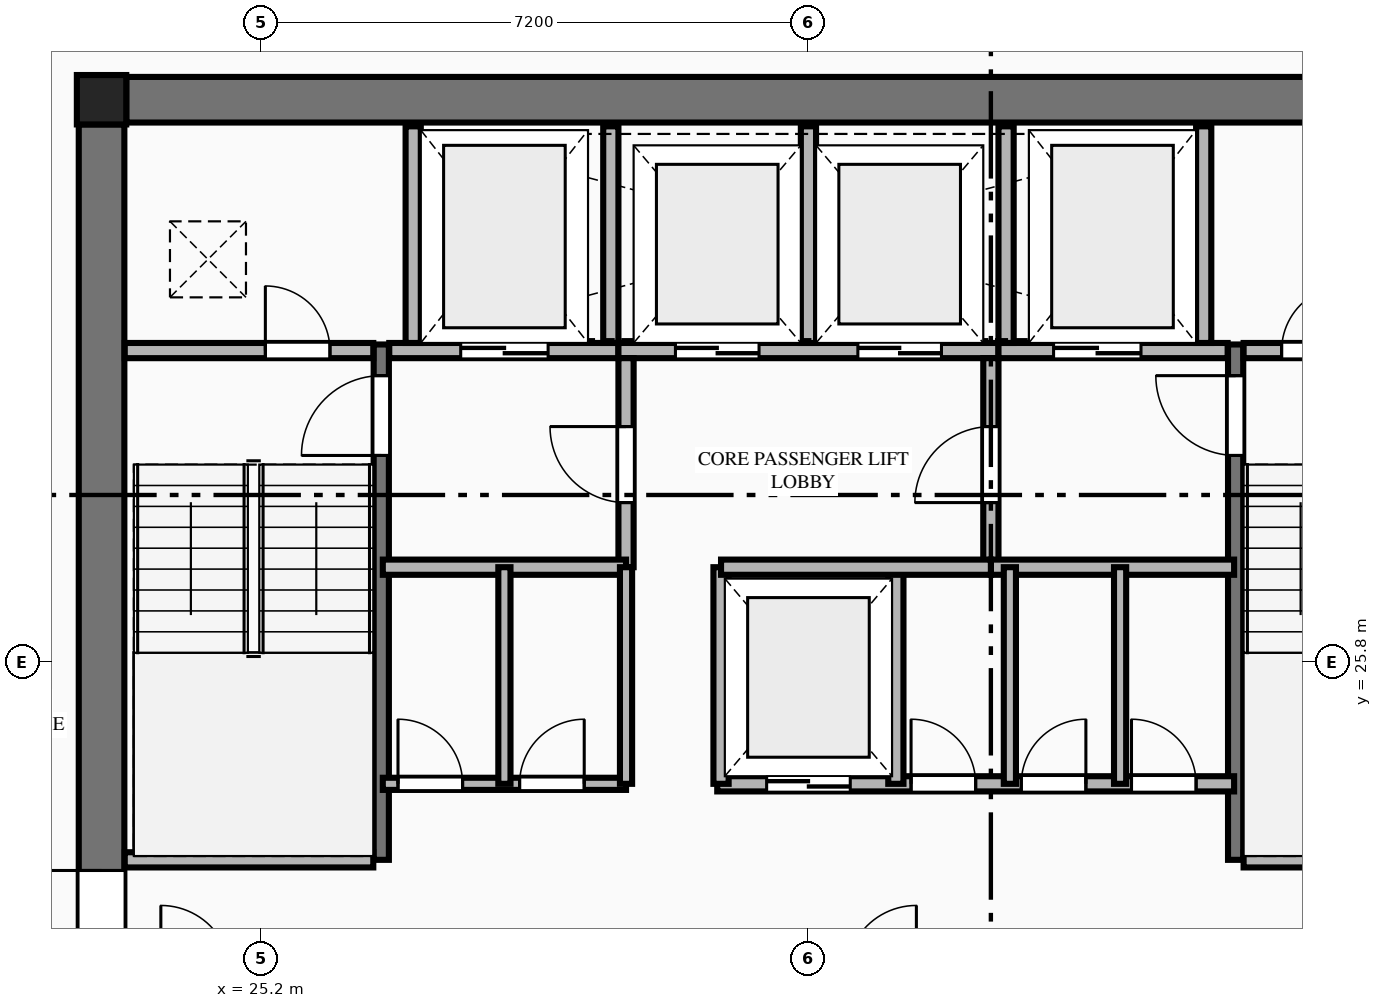
"""IFC4 building model, lengths in metres.
Left out: names, types, materials, properties, quantities, classifications, styles, units other than length and angle.
Written with IfcOpenShell. Run it as: python <this file> out.ifc"""

import sys

from ifc_helpers import new_model, si_unit, direction, frame, frame_2d, origin, origin_2d, place, context, subcontext, project, spatial, rectangle, extrude, element, fill, save


model = new_model("IFC4")
c1 = context("Model", 3, precision=1e-05, world=origin(), true_north=direction((0.0, 1.0)))
c2 = subcontext(c1, "Body", "Model", "MODEL_VIEW")
j1 = project(units=[si_unit("LENGTHUNIT", "METRE"), si_unit("PLANEANGLEUNIT", "RADIAN")], contexts=[c1])
p1 = place(None, origin())
s1 = spatial("IfcSite", under=j1, at=p1, CompositionType="ELEMENT")
p2 = place(p1, origin())
s2 = spatial("IfcBuilding", under=s1, at=p2, CompositionType="ELEMENT")
p3 = place(p2, frame((0.0, 0.0, 193.2)))
s3 = spatial("IfcBuildingStorey", under=s2, at=p3, CompositionType="ELEMENT", Elevation=193.2)
p4 = place(p3, frame((23.1, 33.2, 0.0), z_axis=(0.0, 0.0, 1.0), x_axis=(1.0, 0.0, 0.0)))
e1 = element("IfcColumn", 1, at=p4, inside=s3, PredefinedType="COLUMN", context=c2, shape_type="SweptSolid", body=[
    extrude(rectangle(XDim=0.65, YDim=0.65, at=origin_2d()), origin(), (0.0, 0.0, 1.0), 3.55),
])
p5 = place(p3, frame((23.425, 33.2, 0.0), z_axis=(0.0, 0.0, 1.0), x_axis=(1.0, 0.0, 0.0)))
e2 = element("IfcWall", 2, at=p5, inside=s3, PredefinedType="SHEAR", context=c2, shape_type="SweptSolid", body=[
    extrude(rectangle(XDim=17.95, YDim=0.6, at=frame_2d((8.975, 0.0))), origin(), (0.0, 0.0, 1.0), 3.35),
])
p6 = place(p3, frame((23.1, 18.925, 0.0), z_axis=(0.0, 0.0, 1.0), x_axis=(0.0, 1.0, 0.0)))
e3 = element("IfcWall", 3, at=p6, inside=s3, PredefinedType="SHEAR", context=c2, shape_type="SweptSolid", body=[
    extrude(rectangle(XDim=13.95, YDim=0.6, at=frame_2d((6.975, 0.0))), origin(), (0.0, 0.0, 1.0), 3.35),
])
p7 = place(p6, frame((2.915, 0.0, 0.0)))
e4 = element("IfcOpeningElement", 4, at=p7, cuts=e3, PredefinedType="OPENING", context=c2, shape_type="SweptSolid", body=[
    extrude(rectangle(XDim=1.22, YDim=2.25, at=frame_2d((0.61, 1.125))), frame((0.0, 0.31, 0.0), z_axis=(0.0, -1.0, 0.0), x_axis=(1.0, 0.0, 0.0)), (0.0, 0.0, 1.0), 0.62),
])
p8 = place(p3, frame((26.78, 23.2, 0.0), z_axis=(0.0, 0.0, 1.0), x_axis=(0.0, 1.0, 0.0)))
e5 = element("IfcWall", 5, at=p8, inside=s3, PredefinedType="SHEAR", context=c2, shape_type="SweptSolid", body=[
    extrude(rectangle(XDim=6.78, YDim=0.2, at=frame_2d((3.39, 0.0))), origin(), (0.0, 0.0, 1.0), 3.55),
])
p9 = place(p8, frame((5.32, 0.0, 0.0)))
e6 = element("IfcOpeningElement", 6, at=p9, cuts=e5, PredefinedType="OPENING", context=c2, shape_type="SweptSolid", body=[
    extrude(rectangle(XDim=1.05, YDim=2.15, at=frame_2d((0.525, 1.075))), frame((0.0, 0.11, 0.0), z_axis=(0.0, -1.0, 0.0), x_axis=(1.0, 0.0, 0.0)), (0.0, 0.0, 1.0), 0.22),
])
p10 = place(p3, frame((23.405, 23.2, 0.0), z_axis=(0.0, 0.0, 1.0), x_axis=(1.0, 0.0, 0.0)))
e7 = element("IfcWall", 7, at=p10, inside=s3, PredefinedType="PLUMBINGWALL", context=c2, shape_type="SweptSolid", body=[
    extrude(rectangle(XDim=3.27, YDim=0.2, at=frame_2d((1.635, 0.0))), origin(), (0.0, 0.0, 1.0), 3.35),
])
p11 = place(p3, frame((38.02, 23.2, 0.0), z_axis=(0.0, 0.0, 1.0), x_axis=(0.0, 1.0, 0.0)))
e8 = element("IfcWall", 8, at=p11, inside=s3, PredefinedType="SHEAR", context=c2, shape_type="SweptSolid", body=[
    extrude(rectangle(XDim=6.78, YDim=0.2, at=frame_2d((3.39, 0.0))), origin(), (0.0, 0.0, 1.0), 3.55),
])
p12 = place(p11, frame((5.32, 0.0, 0.0)))
e9 = element("IfcOpeningElement", 9, at=p12, cuts=e8, PredefinedType="OPENING", context=c2, shape_type="SweptSolid", body=[
    extrude(rectangle(XDim=1.05, YDim=2.15, at=frame_2d((0.525, 1.075))), frame((0.0, 0.11, 0.0), z_axis=(0.0, -1.0, 0.0), x_axis=(1.0, 0.0, 0.0)), (0.0, 0.0, 1.0), 0.22),
])
p13 = place(p3, frame((38.125, 23.2, 0.0), z_axis=(0.0, 0.0, 1.0), x_axis=(1.0, 0.0, 0.0)))
e10 = element("IfcWall", 10, at=p13, inside=s3, PredefinedType="PLUMBINGWALL", context=c2, shape_type="SweptSolid", body=[
    extrude(rectangle(XDim=3.27, YDim=0.2, at=frame_2d((1.635, 0.0))), origin(), (0.0, 0.0, 1.0), 3.35),
])
p14 = place(p3, frame((23.405, 29.9, 0.0), z_axis=(0.0, 0.0, 1.0), x_axis=(1.0, 0.0, 0.0)))
e11 = element("IfcWall", 11, at=p14, inside=s3, PredefinedType="PLUMBINGWALL", context=c2, shape_type="SweptSolid", body=[
    extrude(rectangle(XDim=3.27, YDim=0.2, at=frame_2d((1.635, 0.0))), origin(), (0.0, 0.0, 1.0), 3.35),
])
p15 = place(p14, frame((1.85, 0.0, 0.0)))
e12 = element("IfcOpeningElement", 12, at=p15, cuts=e11, PredefinedType="OPENING", context=c2, shape_type="SweptSolid", body=[
    extrude(rectangle(XDim=0.85, YDim=2.05, at=frame_2d((0.425, 1.025))), frame((0.0, 0.11, 0.0), z_axis=(0.0, -1.0, 0.0), x_axis=(1.0, 0.0, 0.0)), (0.0, 0.0, 1.0), 0.22),
])
p16 = place(p3, frame((26.885, 29.9, 0.0), z_axis=(0.0, 0.0, 1.0), x_axis=(1.0, 0.0, 0.0)))
e13 = element("IfcWall", 13, at=p16, inside=s3, PredefinedType="PLUMBINGWALL", context=c2, shape_type="SweptSolid", body=[
    extrude(rectangle(XDim=3.015, YDim=0.2, at=frame_2d((1.507, 0.0))), origin(), (0.0, 0.0, 1.0), 3.35),
])
p17 = place(p16, frame((0.94, 0.0, 0.0)))
e14 = element("IfcOpeningElement", 14, at=p17, cuts=e13, PredefinedType="OPENING", context=c2, shape_type="SweptSolid", body=[
    extrude(rectangle(XDim=1.15, YDim=2.2, at=frame_2d((0.575, 1.1))), frame((0.0, 0.11, 0.0), z_axis=(0.0, -1.0, 0.0), x_axis=(1.0, 0.0, 0.0)), (0.0, 0.0, 1.0), 0.22),
])
p18 = place(p3, frame((29.9, 29.9, 0.0), z_axis=(0.0, 0.0, 1.0), x_axis=(1.0, 0.0, 0.0)))
e15 = element("IfcWall", 15, at=p18, inside=s3, PredefinedType="PLUMBINGWALL", context=c2, shape_type="SweptSolid", body=[
    extrude(rectangle(XDim=5.0, YDim=0.2, at=frame_2d((2.5, 0.0))), origin(), (0.0, 0.0, 1.0), 3.35),
])
p19 = place(p18, frame((0.75, 0.0, 0.0)))
e16 = element("IfcOpeningElement", 16, at=p19, cuts=e15, PredefinedType="OPENING", context=c2, shape_type="SweptSolid", body=[
    extrude(rectangle(XDim=1.1, YDim=2.2, at=frame_2d((0.55, 1.1))), frame((0.0, 0.11, 0.0), z_axis=(0.0, -1.0, 0.0), x_axis=(1.0, 0.0, 0.0)), (0.0, 0.0, 1.0), 0.22),
])
p20 = place(p18, frame((3.15, 0.0, 0.0)))
e17 = element("IfcOpeningElement", 17, at=p20, cuts=e15, PredefinedType="OPENING", context=c2, shape_type="SweptSolid", body=[
    extrude(rectangle(XDim=1.1, YDim=2.2, at=frame_2d((0.55, 1.1))), frame((0.0, 0.11, 0.0), z_axis=(0.0, -1.0, 0.0), x_axis=(1.0, 0.0, 0.0)), (0.0, 0.0, 1.0), 0.22),
])
p21 = place(p3, frame((34.9, 29.9, 0.0), z_axis=(0.0, 0.0, 1.0), x_axis=(1.0, 0.0, 0.0)))
e18 = element("IfcWall", 18, at=p21, inside=s3, PredefinedType="PLUMBINGWALL", context=c2, shape_type="SweptSolid", body=[
    extrude(rectangle(XDim=3.015, YDim=0.2, at=frame_2d((1.508, 0.0))), origin(), (0.0, 0.0, 1.0), 3.35),
])
p22 = place(p21, frame((0.725, 0.0, 0.0)))
e19 = element("IfcOpeningElement", 19, at=p22, cuts=e18, PredefinedType="OPENING", context=c2, shape_type="SweptSolid", body=[
    extrude(rectangle(XDim=1.15, YDim=2.2, at=frame_2d((0.575, 1.1))), frame((0.0, 0.11, 0.0), z_axis=(0.0, -1.0, 0.0), x_axis=(1.0, 0.0, 0.0)), (0.0, 0.0, 1.0), 0.22),
])
p23 = place(p3, frame((38.125, 29.9, 0.0), z_axis=(0.0, 0.0, 1.0), x_axis=(1.0, 0.0, 0.0)))
e20 = element("IfcWall", 20, at=p23, inside=s3, PredefinedType="PLUMBINGWALL", context=c2, shape_type="SweptSolid", body=[
    extrude(rectangle(XDim=3.27, YDim=0.2, at=frame_2d((1.635, 0.0))), origin(), (0.0, 0.0, 1.0), 3.35),
])
p24 = place(p23, frame((0.5, 0.0, 0.0)))
e21 = element("IfcOpeningElement", 21, at=p24, cuts=e20, PredefinedType="OPENING", context=c2, shape_type="SweptSolid", body=[
    extrude(rectangle(XDim=0.85, YDim=2.05, at=frame_2d((0.425, 1.025))), frame((0.0, 0.11, 0.0), z_axis=(0.0, -1.0, 0.0), x_axis=(1.0, 0.0, 0.0)), (0.0, 0.0, 1.0), 0.22),
])
for number, where, z_axis, x_axis in (
    (22, (27.2, 30.0, 0.0), (0.0, 0.0, 1.0), (0.0, 1.0, 0.0)),
    (23, (29.8, 30.0, 0.0), (0.0, 0.0, 1.0), (0.0, 1.0, 0.0)),
    (24, (32.4, 30.0, 0.0), (0.0, 0.0, 1.0), (0.0, 1.0, 0.0)),
    (25, (35.0, 30.0, 0.0), (0.0, 0.0, 1.0), (0.0, 1.0, 0.0)),
    (26, (37.6, 30.0, 0.0), (0.0, 0.0, 1.0), (0.0, 1.0, 0.0)),
):
    element("IfcWall", number, at=place(p3, frame(where, z_axis=z_axis, x_axis=x_axis)), inside=s3, PredefinedType="PLUMBINGWALL", context=c2, shape_type="SweptSolid", body=[
        extrude(rectangle(XDim=2.85, YDim=0.2, at=frame_2d((1.425, 0.0))), origin(), (0.0, 0.0, 1.0), 3.35),
    ])
p25 = place(p3, frame((30.0, 27.05, 0.0), z_axis=(0.0, 0.0, 1.0), x_axis=(0.0, 1.0, 0.0)))
e27 = element("IfcWall", 27, at=p25, inside=s3, PredefinedType="PLUMBINGWALL", context=c2, shape_type="SweptSolid", body=[
    extrude(rectangle(XDim=2.75, YDim=0.2, at=frame_2d((1.375, 0.0))), origin(), (0.0, 0.0, 1.0), 3.35),
])
p26 = place(p25, frame((0.85, 0.0, 0.0)))
e28 = element("IfcOpeningElement", 28, at=p26, cuts=e27, PredefinedType="OPENING", context=c2, shape_type="SweptSolid", body=[
    extrude(rectangle(XDim=1.0, YDim=2.15, at=frame_2d((0.5, 1.075))), frame((0.0, 0.11, 0.0), z_axis=(0.0, -1.0, 0.0), x_axis=(1.0, 0.0, 0.0)), (0.0, 0.0, 1.0), 0.22),
])
p27 = place(p3, frame((26.8, 27.05, 0.0), z_axis=(0.0, 0.0, 1.0), x_axis=(1.0, 0.0, 0.0)))
e29 = element("IfcWall", 29, at=p27, inside=s3, PredefinedType="PLUMBINGWALL", context=c2, shape_type="SweptSolid", body=[
    extrude(rectangle(XDim=3.2, YDim=0.2, at=frame_2d((1.6, 0.0))), origin(), (0.0, 0.0, 1.0), 3.35),
])
p28 = place(p3, frame((34.8, 27.05, 0.0), z_axis=(0.0, 0.0, 1.0), x_axis=(0.0, 1.0, 0.0)))
e30 = element("IfcWall", 30, at=p28, inside=s3, PredefinedType="PLUMBINGWALL", context=c2, shape_type="SweptSolid", body=[
    extrude(rectangle(XDim=2.75, YDim=0.2, at=frame_2d((1.375, 0.0))), origin(), (0.0, 0.0, 1.0), 3.35),
])
p29 = place(p28, frame((0.85, 0.0, 0.0)))
e31 = element("IfcOpeningElement", 31, at=p29, cuts=e30, PredefinedType="OPENING", context=c2, shape_type="SweptSolid", body=[
    extrude(rectangle(XDim=1.0, YDim=2.15, at=frame_2d((0.5, 1.075))), frame((0.0, 0.11, 0.0), z_axis=(0.0, -1.0, 0.0), x_axis=(1.0, 0.0, 0.0)), (0.0, 0.0, 1.0), 0.22),
])
p30 = place(p3, frame((34.8, 27.05, 0.0), z_axis=(0.0, 0.0, 1.0), x_axis=(1.0, 0.0, 0.0)))
e32 = element("IfcWall", 32, at=p30, inside=s3, PredefinedType="PLUMBINGWALL", context=c2, shape_type="SweptSolid", body=[
    extrude(rectangle(XDim=3.2, YDim=0.2, at=frame_2d((1.6, 0.0))), origin(), (0.0, 0.0, 1.0), 3.35),
])
p31 = place(p3, frame((26.8, 24.2, 0.0), z_axis=(0.0, 0.0, 1.0), x_axis=(1.0, 0.0, 0.0)))
e33 = element("IfcWall", 33, at=p31, inside=s3, PredefinedType="PARTITIONING", context=c2, shape_type="SweptSolid", body=[
    extrude(rectangle(XDim=3.2, YDim=0.16, at=frame_2d((1.6, 0.0))), origin(), (0.0, 0.0, 1.0), 3.35),
])
p32 = place(p31, frame((0.2, 0.0, 0.0)))
e34 = element("IfcOpeningElement", 34, at=p32, cuts=e33, PredefinedType="OPENING", context=c2, shape_type="SweptSolid", body=[
    extrude(rectangle(XDim=0.85, YDim=2.05, at=frame_2d((0.425, 1.025))), frame((0.0, 0.09, 0.0), z_axis=(0.0, -1.0, 0.0), x_axis=(1.0, 0.0, 0.0)), (0.0, 0.0, 1.0), 0.18),
])
p33 = place(p31, frame((1.8, 0.0, 0.0)))
e35 = element("IfcOpeningElement", 35, at=p33, cuts=e33, PredefinedType="OPENING", context=c2, shape_type="SweptSolid", body=[
    extrude(rectangle(XDim=0.85, YDim=2.05, at=frame_2d((0.425, 1.025))), frame((0.0, 0.09, 0.0), z_axis=(0.0, -1.0, 0.0), x_axis=(1.0, 0.0, 0.0)), (0.0, 0.0, 1.0), 0.18),
])
p34 = place(p3, frame((30.0, 24.2, 0.0), z_axis=(0.0, 0.0, 1.0), x_axis=(0.0, 1.0, 0.0)))
e36 = element("IfcWall", 36, at=p34, inside=s3, PredefinedType="PARTITIONING", context=c2, shape_type="SweptSolid", body=[
    extrude(rectangle(XDim=2.85, YDim=0.16, at=frame_2d((1.425, 0.0))), origin(), (0.0, 0.0, 1.0), 3.35),
])
p35 = place(p3, frame((31.2, 24.2, 0.0), z_axis=(0.0, 0.0, 1.0), x_axis=(1.0, 0.0, 0.0)))
e37 = element("IfcWall", 37, at=p35, inside=s3, PredefinedType="PLUMBINGWALL", context=c2, shape_type="SweptSolid", body=[
    extrude(rectangle(XDim=6.8, YDim=0.2, at=frame_2d((3.4, 0.0))), origin(), (0.0, 0.0, 1.0), 3.35),
])
p36 = place(p35, frame((0.65, 0.0, 0.0)))
e38 = element("IfcOpeningElement", 38, at=p36, cuts=e37, PredefinedType="OPENING", context=c2, shape_type="SweptSolid", body=[
    extrude(rectangle(XDim=1.1, YDim=2.2, at=frame_2d((0.55, 1.1))), frame((0.0, 0.11, 0.0), z_axis=(0.0, -1.0, 0.0), x_axis=(1.0, 0.0, 0.0)), (0.0, 0.0, 1.0), 0.22),
])
p37 = place(p35, frame((2.55, 0.0, 0.0)))
e39 = element("IfcOpeningElement", 39, at=p37, cuts=e37, PredefinedType="OPENING", context=c2, shape_type="SweptSolid", body=[
    extrude(rectangle(XDim=0.85, YDim=2.05, at=frame_2d((0.425, 1.025))), frame((0.0, 0.11, 0.0), z_axis=(0.0, -1.0, 0.0), x_axis=(1.0, 0.0, 0.0)), (0.0, 0.0, 1.0), 0.22),
])
p38 = place(p35, frame((4.0, 0.0, 0.0)))
e40 = element("IfcOpeningElement", 40, at=p38, cuts=e37, PredefinedType="OPENING", context=c2, shape_type="SweptSolid", body=[
    extrude(rectangle(XDim=0.85, YDim=2.05, at=frame_2d((0.425, 1.025))), frame((0.0, 0.11, 0.0), z_axis=(0.0, -1.0, 0.0), x_axis=(1.0, 0.0, 0.0)), (0.0, 0.0, 1.0), 0.22),
])
p39 = place(p35, frame((5.45, 0.0, 0.0)))
e41 = element("IfcOpeningElement", 41, at=p39, cuts=e37, PredefinedType="OPENING", context=c2, shape_type="SweptSolid", body=[
    extrude(rectangle(XDim=0.85, YDim=2.05, at=frame_2d((0.425, 1.025))), frame((0.0, 0.11, 0.0), z_axis=(0.0, -1.0, 0.0), x_axis=(1.0, 0.0, 0.0)), (0.0, 0.0, 1.0), 0.22),
])
for number, where, z_axis, x_axis in (
    (42, (31.25, 24.2, 0.0), (0.0, 0.0, 1.0), (0.0, 1.0, 0.0)),
    (43, (33.55, 24.2, 0.0), (0.0, 0.0, 1.0), (0.0, 1.0, 0.0)),
):
    element("IfcWall", number, at=place(p3, frame(where, z_axis=z_axis, x_axis=x_axis)), inside=s3, PredefinedType="PLUMBINGWALL", context=c2, shape_type="SweptSolid", body=[
        extrude(rectangle(XDim=2.85, YDim=0.2, at=frame_2d((1.425, 0.0))), origin(), (0.0, 0.0, 1.0), 3.35),
    ])
p40 = place(p3, frame((31.25, 27.05, 0.0), z_axis=(0.0, 0.0, 1.0), x_axis=(1.0, 0.0, 0.0)))
e44 = element("IfcWall", 44, at=p40, inside=s3, PredefinedType="PLUMBINGWALL", context=c2, shape_type="SweptSolid", body=[
    extrude(rectangle(XDim=3.55, YDim=0.2, at=frame_2d((1.775, 0.0))), origin(), (0.0, 0.0, 1.0), 3.35),
])
for number, where, z_axis, x_axis in (
    (45, (28.4, 24.2, 0.0), (0.0, 0.0, 1.0), (0.0, 1.0, 0.0)),
    (46, (35.05, 24.2, 0.0), (0.0, 0.0, 1.0), (0.0, 1.0, 0.0)),
    (47, (36.5, 24.2, 0.0), (0.0, 0.0, 1.0), (0.0, 1.0, 0.0)),
):
    element("IfcWall", number, at=place(p3, frame(where, z_axis=z_axis, x_axis=x_axis)), inside=s3, PredefinedType="PARTITIONING", context=c2, shape_type="SweptSolid", body=[
        extrude(rectangle(XDim=2.85, YDim=0.16, at=frame_2d((1.425, 0.0))), origin(), (0.0, 0.0, 1.0), 3.35),
    ])
p41 = place(p7, origin())
e48 = element("IfcDoor", 48, at=p41, inside=s3, OperationType="SINGLE_SWING_RIGHT", PredefinedType="DOOR", context=c2, shape_type="SweptSolid", body=[
    extrude(rectangle(XDim=1.22, YDim=2.25, at=frame_2d((0.61, 1.125))), frame((0.0, 0.025, 0.0), z_axis=(0.0, -1.0, 0.0), x_axis=(1.0, 0.0, 0.0)), (0.0, 0.0, 1.0), 0.05),
])
fill(e4, e48)
p42 = place(p9, origin())
e49 = element("IfcDoor", 49, at=p42, inside=s3, OperationType="SINGLE_SWING_LEFT", PredefinedType="DOOR", context=c2, shape_type="SweptSolid", body=[
    extrude(rectangle(XDim=1.05, YDim=2.15, at=frame_2d((0.525, 1.075))), frame((0.0, 0.025, 0.0), z_axis=(0.0, -1.0, 0.0), x_axis=(1.0, 0.0, 0.0)), (0.0, 0.0, 1.0), 0.05),
])
fill(e6, e49)
p43 = place(p12, origin())
e50 = element("IfcDoor", 50, at=p43, inside=s3, OperationType="SINGLE_SWING_RIGHT", PredefinedType="DOOR", context=c2, shape_type="SweptSolid", body=[
    extrude(rectangle(XDim=1.05, YDim=2.15, at=frame_2d((0.525, 1.075))), frame((0.0, 0.025, 0.0), z_axis=(0.0, -1.0, 0.0), x_axis=(1.0, 0.0, 0.0)), (0.0, 0.0, 1.0), 0.05),
])
fill(e9, e50)
p44 = place(p15, origin())
e51 = element("IfcDoor", 51, at=p44, inside=s3, OperationType="SINGLE_SWING_LEFT", PredefinedType="DOOR", context=c2, shape_type="SweptSolid", body=[
    extrude(rectangle(XDim=0.85, YDim=2.05, at=frame_2d((0.425, 1.025))), frame((0.0, 0.025, 0.0), z_axis=(0.0, -1.0, 0.0), x_axis=(1.0, 0.0, 0.0)), (0.0, 0.0, 1.0), 0.05),
])
fill(e12, e51)
p45 = place(p24, origin())
e52 = element("IfcDoor", 52, at=p45, inside=s3, OperationType="SINGLE_SWING_RIGHT", PredefinedType="DOOR", context=c2, shape_type="SweptSolid", body=[
    extrude(rectangle(XDim=0.85, YDim=2.05, at=frame_2d((0.425, 1.025))), frame((0.0, 0.025, 0.0), z_axis=(0.0, -1.0, 0.0), x_axis=(1.0, 0.0, 0.0)), (0.0, 0.0, 1.0), 0.05),
])
fill(e21, e52)
p46 = place(p17, origin())
e53 = element("IfcDoor", 53, at=p46, inside=s3, OperationType="DOUBLE_DOOR_SLIDING", PredefinedType="DOOR", context=c2, shape_type="SweptSolid", body=[
    extrude(rectangle(XDim=1.15, YDim=2.2, at=frame_2d((0.575, 1.1))), frame((0.0, 0.025, 0.0), z_axis=(0.0, -1.0, 0.0), x_axis=(1.0, 0.0, 0.0)), (0.0, 0.0, 1.0), 0.05),
])
fill(e14, e53)
p47 = place(p22, origin())
e54 = element("IfcDoor", 54, at=p47, inside=s3, OperationType="DOUBLE_DOOR_SLIDING", PredefinedType="DOOR", context=c2, shape_type="SweptSolid", body=[
    extrude(rectangle(XDim=1.15, YDim=2.2, at=frame_2d((0.575, 1.1))), frame((0.0, 0.025, 0.0), z_axis=(0.0, -1.0, 0.0), x_axis=(1.0, 0.0, 0.0)), (0.0, 0.0, 1.0), 0.05),
])
fill(e19, e54)
p48 = place(p19, origin())
e55 = element("IfcDoor", 55, at=p48, inside=s3, OperationType="DOUBLE_DOOR_SLIDING", PredefinedType="DOOR", context=c2, shape_type="SweptSolid", body=[
    extrude(rectangle(XDim=1.1, YDim=2.2, at=frame_2d((0.55, 1.1))), frame((0.0, 0.025, 0.0), z_axis=(0.0, -1.0, 0.0), x_axis=(1.0, 0.0, 0.0)), (0.0, 0.0, 1.0), 0.05),
])
fill(e16, e55)
p49 = place(p20, origin())
e56 = element("IfcDoor", 56, at=p49, inside=s3, OperationType="DOUBLE_DOOR_SLIDING", PredefinedType="DOOR", context=c2, shape_type="SweptSolid", body=[
    extrude(rectangle(XDim=1.1, YDim=2.2, at=frame_2d((0.55, 1.1))), frame((0.0, 0.025, 0.0), z_axis=(0.0, -1.0, 0.0), x_axis=(1.0, 0.0, 0.0)), (0.0, 0.0, 1.0), 0.05),
])
fill(e17, e56)
p50 = place(p26, origin())
e57 = element("IfcDoor", 57, at=p50, inside=s3, OperationType="SINGLE_SWING_RIGHT", PredefinedType="DOOR", context=c2, shape_type="SweptSolid", body=[
    extrude(rectangle(XDim=1.0, YDim=2.15, at=frame_2d((0.5, 1.075))), frame((0.0, 0.025, 0.0), z_axis=(0.0, -1.0, 0.0), x_axis=(1.0, 0.0, 0.0)), (0.0, 0.0, 1.0), 0.05),
])
fill(e28, e57)
p51 = place(p29, origin())
e58 = element("IfcDoor", 58, at=p51, inside=s3, OperationType="SINGLE_SWING_LEFT", PredefinedType="DOOR", context=c2, shape_type="SweptSolid", body=[
    extrude(rectangle(XDim=1.0, YDim=2.15, at=frame_2d((0.5, 1.075))), frame((0.0, 0.025, 0.0), z_axis=(0.0, -1.0, 0.0), x_axis=(1.0, 0.0, 0.0)), (0.0, 0.0, 1.0), 0.05),
])
fill(e31, e58)
p52 = place(p36, origin())
e59 = element("IfcDoor", 59, at=p52, inside=s3, OperationType="DOUBLE_DOOR_SLIDING", PredefinedType="DOOR", context=c2, shape_type="SweptSolid", body=[
    extrude(rectangle(XDim=1.1, YDim=2.2, at=frame_2d((0.55, 1.1))), frame((0.0, 0.025, 0.0), z_axis=(0.0, -1.0, 0.0), x_axis=(1.0, 0.0, 0.0)), (0.0, 0.0, 1.0), 0.05),
])
fill(e38, e59)
p53 = place(p32, origin())
e60 = element("IfcDoor", 60, at=p53, inside=s3, OperationType="SINGLE_SWING_LEFT", PredefinedType="DOOR", context=c2, shape_type="SweptSolid", body=[
    extrude(rectangle(XDim=0.85, YDim=2.05, at=frame_2d((0.425, 1.025))), frame((0.0, 0.025, 0.0), z_axis=(0.0, -1.0, 0.0), x_axis=(1.0, 0.0, 0.0)), (0.0, 0.0, 1.0), 0.05),
])
fill(e34, e60)
p54 = place(p33, origin())
e61 = element("IfcDoor", 61, at=p54, inside=s3, OperationType="SINGLE_SWING_RIGHT", PredefinedType="DOOR", context=c2, shape_type="SweptSolid", body=[
    extrude(rectangle(XDim=0.85, YDim=2.05, at=frame_2d((0.425, 1.025))), frame((0.0, 0.025, 0.0), z_axis=(0.0, -1.0, 0.0), x_axis=(1.0, 0.0, 0.0)), (0.0, 0.0, 1.0), 0.05),
])
fill(e35, e61)
p55 = place(p37, origin())
e62 = element("IfcDoor", 62, at=p55, inside=s3, OperationType="SINGLE_SWING_LEFT", PredefinedType="DOOR", context=c2, shape_type="SweptSolid", body=[
    extrude(rectangle(XDim=0.85, YDim=2.05, at=frame_2d((0.425, 1.025))), frame((0.0, 0.025, 0.0), z_axis=(0.0, -1.0, 0.0), x_axis=(1.0, 0.0, 0.0)), (0.0, 0.0, 1.0), 0.05),
])
fill(e39, e62)
p56 = place(p38, origin())
e63 = element("IfcDoor", 63, at=p56, inside=s3, OperationType="SINGLE_SWING_RIGHT", PredefinedType="DOOR", context=c2, shape_type="SweptSolid", body=[
    extrude(rectangle(XDim=0.85, YDim=2.05, at=frame_2d((0.425, 1.025))), frame((0.0, 0.025, 0.0), z_axis=(0.0, -1.0, 0.0), x_axis=(1.0, 0.0, 0.0)), (0.0, 0.0, 1.0), 0.05),
])
fill(e40, e63)
p57 = place(p39, origin())
e64 = element("IfcDoor", 64, at=p57, inside=s3, OperationType="SINGLE_SWING_LEFT", PredefinedType="DOOR", context=c2, shape_type="SweptSolid", body=[
    extrude(rectangle(XDim=0.85, YDim=2.05, at=frame_2d((0.425, 1.025))), frame((0.0, 0.025, 0.0), z_axis=(0.0, -1.0, 0.0), x_axis=(1.0, 0.0, 0.0)), (0.0, 0.0, 1.0), 0.05),
])
fill(e41, e64)
save(model, sys.argv[1])
